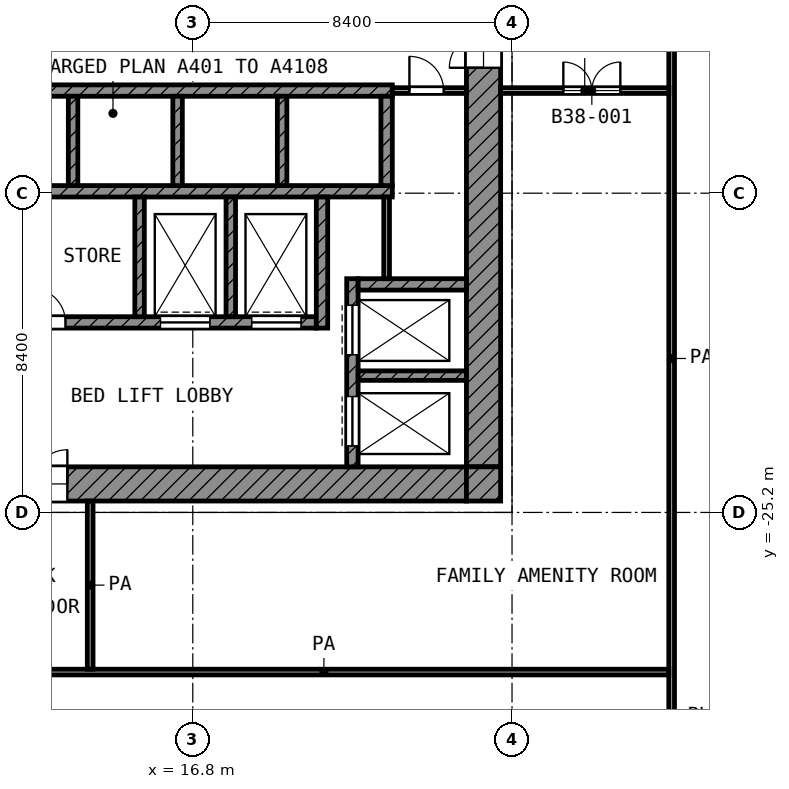
"""IFC4 building model, lengths in metres.
Left out: names, types, materials, properties, quantities, classifications, styles, units other than length and angle.
Written with IfcOpenShell. Run it as: python <this file> out.ifc"""

import sys

from ifc_helpers import new_model, si_unit, direction, frame, frame_2d, origin, place, context, subcontext, project, spatial, rectangle, extrude, element, fill, save


model = new_model("IFC4")
c1 = context("Model", 3, precision=1e-05, world=origin(), true_north=direction((0.0, 1.0)))
c2 = subcontext(c1, "Body", "Model", "MODEL_VIEW")
j1 = project(units=[si_unit("LENGTHUNIT", "METRE"), si_unit("PLANEANGLEUNIT", "RADIAN")], contexts=[c1])
p1 = place(None, origin())
s1 = spatial("IfcSite", under=j1, at=p1, CompositionType="ELEMENT")
p2 = place(p1, origin())
s2 = spatial("IfcBuilding", under=s1, at=p2, CompositionType="ELEMENT")
p3 = place(p2, frame((0.0, 0.0, 166.8)))
s3 = spatial("IfcBuildingStorey", under=s2, at=p3, CompositionType="ELEMENT", Elevation=166.8)
p4 = place(p3, frame((24.45, -24.0, 0.0), z_axis=(0.0, 0.0, 1.0), x_axis=(0.0, 1.0, 0.0)))
e1 = element("IfcWall", 1, at=p4, inside=s3, PredefinedType="SHEAR", context=c2, shape_type="SweptSolid", body=[
    extrude(rectangle(XDim=18.6, YDim=0.9, at=frame_2d((9.3, 0.0))), origin(), (0.0, 0.0, 1.0), 3.6),
])
p5 = place(p4, frame((10.5, 0.0, 0.0)))
e2 = element("IfcOpeningElement", 2, at=p5, cuts=e1, PredefinedType="OPENING", context=c2, shape_type="SweptSolid", body=[
    extrude(rectangle(XDim=1.8, YDim=2.1, at=frame_2d((0.9, 1.05))), frame((0.0, 0.46, 0.0), z_axis=(0.0, -1.0, 0.0), x_axis=(1.0, 0.0, 0.0)), (0.0, 0.0, 1.0), 0.92),
])
p6 = place(p3, frame((5.4, -24.45, 0.0), z_axis=(0.0, 0.0, 1.0), x_axis=(1.0, 0.0, 0.0)))
e3 = element("IfcWall", 3, at=p6, inside=s3, PredefinedType="SHEAR", context=c2, shape_type="SweptSolid", body=[
    extrude(rectangle(XDim=18.6, YDim=0.9, at=frame_2d((9.3, 0.0))), origin(), (0.0, 0.0, 1.0), 3.6),
])
p7 = place(p6, frame((6.3, 0.0, 0.0)))
e4 = element("IfcOpeningElement", 4, at=p7, cuts=e3, PredefinedType="OPENING", context=c2, shape_type="SweptSolid", body=[
    extrude(rectangle(XDim=1.8, YDim=2.1, at=frame_2d((0.9, 1.05))), frame((0.0, 0.46, 0.0), z_axis=(0.0, -1.0, 0.0), x_axis=(1.0, 0.0, 0.0)), (0.0, 0.0, 1.0), 0.92),
])
p8 = place(p3, frame((24.45, -24.9, 0.0), z_axis=(0.0, 0.0, 1.0), x_axis=(0.0, 1.0, 0.0)))
e5 = element("IfcWall", 5, at=p8, inside=s3, PredefinedType="SHEAR", context=c2, shape_type="SweptSolid", body=[
    extrude(rectangle(XDim=0.9, YDim=0.9, at=frame_2d((0.45, 0.0))), origin(), (0.0, 0.0, 1.0), 3.6),
])
p9 = place(p3, frame((5.4, -14.1, 0.0), z_axis=(0.0, 0.0, 1.0), x_axis=(1.0, 0.0, 0.0)))
e6 = element("IfcWall", 6, at=p9, inside=s3, PredefinedType="SHEAR", context=c2, shape_type="SweptSolid", body=[
    extrude(rectangle(XDim=16.65, YDim=0.3, at=frame_2d((8.325, 0.0))), origin(), (0.0, 0.0, 1.0), 3.6),
])
p10 = place(p9, frame((0.825, 0.0, 0.0)))
e7 = element("IfcOpeningElement", 7, at=p10, cuts=e6, PredefinedType="OPENING", context=c2, shape_type="SweptSolid", body=[
    extrude(rectangle(XDim=1.1, YDim=2.1, at=frame_2d((0.55, 1.05))), frame((0.0, 0.16, 0.0), z_axis=(0.0, -1.0, 0.0), x_axis=(1.0, 0.0, 0.0)), (0.0, 0.0, 1.0), 0.32),
])
p11 = place(p9, frame((3.575, 0.0, 0.0)))
e8 = element("IfcOpeningElement", 8, at=p11, cuts=e6, PredefinedType="OPENING", context=c2, shape_type="SweptSolid", body=[
    extrude(rectangle(XDim=1.1, YDim=2.1, at=frame_2d((0.55, 1.05))), frame((0.0, 0.16, 0.0), z_axis=(0.0, -1.0, 0.0), x_axis=(1.0, 0.0, 0.0)), (0.0, 0.0, 1.0), 0.32),
])
p12 = place(p3, frame((5.4, -16.75, 0.0), z_axis=(0.0, 0.0, 1.0), x_axis=(1.0, 0.0, 0.0)))
e9 = element("IfcWall", 9, at=p12, inside=s3, PredefinedType="SHEAR", context=c2, shape_type="SweptSolid", body=[
    extrude(rectangle(XDim=16.65, YDim=0.3, at=frame_2d((8.325, 0.0))), origin(), (0.0, 0.0, 1.0), 3.6),
])
p13 = place(p3, frame((5.4, -20.2, 0.0), z_axis=(0.0, 0.0, 1.0), x_axis=(1.0, 0.0, 0.0)))
e10 = element("IfcWall", 10, at=p13, inside=s3, PredefinedType="SHEAR", context=c2, shape_type="SweptSolid", body=[
    extrude(rectangle(XDim=14.65, YDim=0.3, at=frame_2d((7.325, 0.0))), origin(), (0.0, 0.0, 1.0), 3.6),
])
p14 = place(p13, frame((10.55, 0.0, 0.0)))
e11 = element("IfcOpeningElement", 11, at=p14, cuts=e10, PredefinedType="OPENING", context=c2, shape_type="SweptSolid", body=[
    extrude(rectangle(XDim=1.3, YDim=2.1, at=frame_2d((0.65, 1.05))), frame((0.0, 0.16, 0.0), z_axis=(0.0, -1.0, 0.0), x_axis=(1.0, 0.0, 0.0)), (0.0, 0.0, 1.0), 0.32),
])
p15 = place(p13, frame((12.95, 0.0, 0.0)))
e12 = element("IfcOpeningElement", 12, at=p15, cuts=e10, PredefinedType="OPENING", context=c2, shape_type="SweptSolid", body=[
    extrude(rectangle(XDim=1.3, YDim=2.1, at=frame_2d((0.65, 1.05))), frame((0.0, 0.16, 0.0), z_axis=(0.0, -1.0, 0.0), x_axis=(1.0, 0.0, 0.0)), (0.0, 0.0, 1.0), 0.32),
])
p16 = place(p13, frame((0.55, 0.0, 0.0)))
e13 = element("IfcOpeningElement", 13, at=p16, cuts=e10, PredefinedType="OPENING", context=c2, shape_type="SweptSolid", body=[
    extrude(rectangle(XDim=1.3, YDim=2.1, at=frame_2d((0.65, 1.05))), frame((0.0, 0.16, 0.0), z_axis=(0.0, -1.0, 0.0), x_axis=(1.0, 0.0, 0.0)), (0.0, 0.0, 1.0), 0.32),
])
p17 = place(p13, frame((2.95, 0.0, 0.0)))
e14 = element("IfcOpeningElement", 14, at=p17, cuts=e10, PredefinedType="OPENING", context=c2, shape_type="SweptSolid", body=[
    extrude(rectangle(XDim=1.3, YDim=2.1, at=frame_2d((0.65, 1.05))), frame((0.0, 0.16, 0.0), z_axis=(0.0, -1.0, 0.0), x_axis=(1.0, 0.0, 0.0)), (0.0, 0.0, 1.0), 0.32),
])
p18 = place(p13, frame((7.15, 0.0, 0.0)))
e15 = element("IfcOpeningElement", 15, at=p18, cuts=e10, PredefinedType="OPENING", context=c2, shape_type="SweptSolid", body=[
    extrude(rectangle(XDim=0.9, YDim=2.1, at=frame_2d((0.45, 1.05))), frame((0.0, 0.16, 0.0), z_axis=(0.0, -1.0, 0.0), x_axis=(1.0, 0.0, 0.0)), (0.0, 0.0, 1.0), 0.32),
])
p19 = place(p3, frame((20.2, -20.35, 0.0), z_axis=(0.0, 0.0, 1.0), x_axis=(0.0, 1.0, 0.0)))
e16 = element("IfcWall", 16, at=p19, inside=s3, PredefinedType="SHEAR", context=c2, shape_type="SweptSolid", body=[
    extrude(rectangle(XDim=3.45, YDim=0.3, at=frame_2d((1.725, 0.0))), origin(), (0.0, 0.0, 1.0), 3.6),
])
p20 = place(p3, frame((21.9, -16.6, 0.0), z_axis=(0.0, 0.0, 1.0), x_axis=(0.0, 1.0, 0.0)))
e17 = element("IfcWall", 17, at=p20, inside=s3, PredefinedType="SHEAR", context=c2, shape_type="SweptSolid", body=[
    extrude(rectangle(XDim=2.35, YDim=0.3, at=frame_2d((1.175, 0.0))), origin(), (0.0, 0.0, 1.0), 3.6),
])
p21 = place(p3, frame((21.15, -19.2, 0.0), z_axis=(0.0, 0.0, 1.0), x_axis=(1.0, 0.0, 0.0)))
e18 = element("IfcWall", 18, at=p21, inside=s3, PredefinedType="SHEAR", context=c2, shape_type="SweptSolid", body=[
    extrude(rectangle(XDim=2.85, YDim=0.3, at=frame_2d((1.425, 0.0))), origin(), (0.0, 0.0, 1.0), 3.6),
])
p22 = place(p3, frame((21.0, -24.0, 0.0), z_axis=(0.0, 0.0, 1.0), x_axis=(0.0, 1.0, 0.0)))
e19 = element("IfcWall", 19, at=p22, inside=s3, PredefinedType="SHEAR", context=c2, shape_type="SweptSolid", body=[
    extrude(rectangle(XDim=4.95, YDim=0.3, at=frame_2d((2.475, 0.0))), origin(), (0.0, 0.0, 1.0), 3.6),
])
p23 = place(p22, frame((2.95, 0.0, 0.0)))
e20 = element("IfcOpeningElement", 20, at=p23, cuts=e19, PredefinedType="OPENING", context=c2, shape_type="SweptSolid", body=[
    extrude(rectangle(XDim=1.3, YDim=2.1, at=frame_2d((0.65, 1.05))), frame((0.0, 0.16, 0.0), z_axis=(0.0, -1.0, 0.0), x_axis=(1.0, 0.0, 0.0)), (0.0, 0.0, 1.0), 0.32),
])
p24 = place(p22, frame((0.55, 0.0, 0.0)))
e21 = element("IfcOpeningElement", 21, at=p24, cuts=e19, PredefinedType="OPENING", context=c2, shape_type="SweptSolid", body=[
    extrude(rectangle(XDim=1.3, YDim=2.1, at=frame_2d((0.65, 1.05))), frame((0.0, 0.16, 0.0), z_axis=(0.0, -1.0, 0.0), x_axis=(1.0, 0.0, 0.0)), (0.0, 0.0, 1.0), 0.32),
])
p25 = place(p3, frame((21.15, -21.6, 0.0), z_axis=(0.0, 0.0, 1.0), x_axis=(1.0, 0.0, 0.0)))
e22 = element("IfcWall", 22, at=p25, inside=s3, PredefinedType="SHEAR", context=c2, shape_type="SweptSolid", body=[
    extrude(rectangle(XDim=2.85, YDim=0.25, at=frame_2d((1.425, 0.0))), origin(), (0.0, 0.0, 1.0), 3.6),
])
for number, where, z_axis, x_axis in (
    (23, (15.4, -20.05, 0.0), (0.0, 0.0, 1.0), (0.0, 1.0, 0.0)),
    (24, (17.8, -20.05, 0.0), (0.0, 0.0, 1.0), (0.0, 1.0, 0.0)),
):
    element("IfcWall", number, at=place(p3, frame(where, z_axis=z_axis, x_axis=x_axis)), inside=s3, PredefinedType="SHEAR", context=c2, shape_type="SweptSolid", body=[
        extrude(rectangle(XDim=3.15, YDim=0.25, at=frame_2d((1.575, 0.0))), origin(), (0.0, 0.0, 1.0), 3.6),
    ])
for number, where, z_axis, x_axis in (
    (25, (13.65, -16.6, 0.0), (0.0, 0.0, 1.0), (0.0, 1.0, 0.0)),
    (26, (16.4, -16.6, 0.0), (0.0, 0.0, 1.0), (0.0, 1.0, 0.0)),
    (27, (19.15, -16.6, 0.0), (0.0, 0.0, 1.0), (0.0, 1.0, 0.0)),
):
    element("IfcWall", number, at=place(p3, frame(where, z_axis=z_axis, x_axis=x_axis)), inside=s3, PredefinedType="SHEAR", context=c2, shape_type="SweptSolid", body=[
        extrude(rectangle(XDim=2.35, YDim=0.25, at=frame_2d((1.175, 0.0))), origin(), (0.0, 0.0, 1.0), 3.6),
    ])
p26 = place(p3, frame((21.9, -19.05, 0.0), z_axis=(0.0, 0.0, 1.0), x_axis=(0.0, 1.0, 0.0)))
e28 = element("IfcWall", 28, at=p26, inside=s3, PredefinedType="PARTITIONING", context=c2, shape_type="SweptSolid", body=[
    extrude(rectangle(XDim=2.15, YDim=0.15, at=frame_2d((1.075, 0.0))), origin(), (0.0, 0.0, 1.0), 3.6),
])
p27 = place(p3, frame((22.05, -14.1, 0.0), z_axis=(0.0, 0.0, 1.0), x_axis=(1.0, 0.0, 0.0)))
e29 = element("IfcWall", 29, at=p27, inside=s3, PredefinedType="PARTITIONING", context=c2, shape_type="SweptSolid", body=[
    extrude(rectangle(XDim=1.95, YDim=0.15, at=frame_2d((0.975, 0.0))), origin(), (0.0, 0.0, 1.0), 3.6),
])
p28 = place(p27, frame((0.45, 0.0, 0.0)))
e30 = element("IfcOpeningElement", 30, at=p28, cuts=e29, PredefinedType="OPENING", context=c2, shape_type="SweptSolid", body=[
    extrude(rectangle(XDim=0.9, YDim=2.1, at=frame_2d((0.45, 1.05))), frame((0.0, 0.085, 0.0), z_axis=(0.0, -1.0, 0.0), x_axis=(1.0, 0.0, 0.0)), (0.0, 0.0, 1.0), 0.17),
])
p29 = place(p3, frame((11.175, -29.4, 0.0), z_axis=(0.0, 0.0, 1.0), x_axis=(1.0, 0.0, 0.0)))
e31 = element("IfcWall", 31, at=p29, inside=s3, PredefinedType="PARTITIONING", context=c2, shape_type="SweptSolid", body=[
    extrude(rectangle(XDim=18.15, YDim=0.15, at=frame_2d((9.075, 0.0))), origin(), (0.0, 0.0, 1.0), 3.6),
])
p30 = place(p3, frame((24.9, -14.1, 0.0), z_axis=(0.0, 0.0, 1.0), x_axis=(1.0, 0.0, 0.0)))
e32 = element("IfcWall", 32, at=p30, inside=s3, PredefinedType="PARTITIONING", context=c2, shape_type="SweptSolid", body=[
    extrude(rectangle(XDim=4.425, YDim=0.15, at=frame_2d((2.212, 0.0))), origin(), (0.0, 0.0, 1.0), 3.6),
])
p31 = place(p30, frame((1.65, 0.0, 0.0)))
e33 = element("IfcOpeningElement", 33, at=p31, cuts=e32, PredefinedType="OPENING", context=c2, shape_type="SweptSolid", body=[
    extrude(rectangle(XDim=1.5, YDim=2.1, at=frame_2d((0.75, 1.05))), frame((0.0, 0.085, 0.0), z_axis=(0.0, -1.0, 0.0), x_axis=(1.0, 0.0, 0.0)), (0.0, 0.0, 1.0), 0.17),
])
p32 = place(p3, frame((14.1, -29.325, 0.0), z_axis=(0.0, 0.0, 1.0), x_axis=(0.0, 1.0, 0.0)))
e34 = element("IfcWall", 34, at=p32, inside=s3, PredefinedType="PARTITIONING", context=c2, shape_type="SweptSolid", body=[
    extrude(rectangle(XDim=4.425, YDim=0.15, at=frame_2d((2.212, 0.0))), origin(), (0.0, 0.0, 1.0), 3.6),
])
p33 = place(p3, frame((29.4, -31.198, 0.0), z_axis=(0.0, 0.0, 1.0), x_axis=(0.0, 1.0, 0.0)))
e35 = element("IfcWall", 35, at=p33, inside=s3, PredefinedType="PARTITIONING", context=c2, shape_type="SweptSolid", body=[
    extrude(rectangle(XDim=20.098, YDim=0.15, at=frame_2d((10.049, 0.0))), origin(), (0.0, 0.0, 1.0), 3.6),
])
p34 = place(p23, origin())
e36 = element("IfcDoor", 36, at=p34, inside=s3, OperationType="DOUBLE_DOOR_SLIDING", PredefinedType="DOOR", context=c2, shape_type="SweptSolid", body=[
    extrude(rectangle(XDim=1.3, YDim=2.1, at=frame_2d((0.65, 1.05))), frame((0.0, 0.025, 0.0), z_axis=(0.0, -1.0, 0.0), x_axis=(1.0, 0.0, 0.0)), (0.0, 0.0, 1.0), 0.05),
])
fill(e20, e36)
p35 = place(p24, origin())
e37 = element("IfcDoor", 37, at=p35, inside=s3, OperationType="DOUBLE_DOOR_SLIDING", PredefinedType="DOOR", context=c2, shape_type="SweptSolid", body=[
    extrude(rectangle(XDim=1.3, YDim=2.1, at=frame_2d((0.65, 1.05))), frame((0.0, 0.025, 0.0), z_axis=(0.0, -1.0, 0.0), x_axis=(1.0, 0.0, 0.0)), (0.0, 0.0, 1.0), 0.05),
])
fill(e21, e37)
p36 = place(p14, origin())
e38 = element("IfcDoor", 38, at=p36, inside=s3, OperationType="DOUBLE_DOOR_SLIDING", PredefinedType="DOOR", context=c2, shape_type="SweptSolid", body=[
    extrude(rectangle(XDim=1.3, YDim=2.1, at=frame_2d((0.65, 1.05))), frame((0.0, 0.025, 0.0), z_axis=(0.0, -1.0, 0.0), x_axis=(1.0, 0.0, 0.0)), (0.0, 0.0, 1.0), 0.05),
])
fill(e11, e38)
p37 = place(p15, origin())
e39 = element("IfcDoor", 39, at=p37, inside=s3, OperationType="DOUBLE_DOOR_SLIDING", PredefinedType="DOOR", context=c2, shape_type="SweptSolid", body=[
    extrude(rectangle(XDim=1.3, YDim=2.1, at=frame_2d((0.65, 1.05))), frame((0.0, 0.025, 0.0), z_axis=(0.0, -1.0, 0.0), x_axis=(1.0, 0.0, 0.0)), (0.0, 0.0, 1.0), 0.05),
])
fill(e12, e39)
p38 = place(p5, origin())
e40 = element("IfcDoor", 40, at=p38, inside=s3, OperationType="DOUBLE_DOOR_SINGLE_SWING", PredefinedType="DOOR", context=c2, shape_type="SweptSolid", body=[
    extrude(rectangle(XDim=1.8, YDim=2.1, at=frame_2d((0.9, 1.05))), frame((0.0, 0.025, 0.0), z_axis=(0.0, -1.0, 0.0), x_axis=(1.0, 0.0, 0.0)), (0.0, 0.0, 1.0), 0.05),
])
fill(e2, e40)
p39 = place(p7, origin())
e41 = element("IfcDoor", 41, at=p39, inside=s3, OperationType="DOUBLE_DOOR_SINGLE_SWING", PredefinedType="DOOR", context=c2, shape_type="SweptSolid", body=[
    extrude(rectangle(XDim=1.8, YDim=2.1, at=frame_2d((0.9, 1.05))), frame((0.0, 0.025, 0.0), z_axis=(0.0, -1.0, 0.0), x_axis=(1.0, 0.0, 0.0)), (0.0, 0.0, 1.0), 0.05),
])
fill(e4, e41)
p40 = place(p28, origin())
e42 = element("IfcDoor", 42, at=p40, inside=s3, OperationType="SINGLE_SWING_LEFT", PredefinedType="DOOR", context=c2, shape_type="SweptSolid", body=[
    extrude(rectangle(XDim=0.9, YDim=2.1, at=frame_2d((0.45, 1.05))), frame((0.0, 0.025, 0.0), z_axis=(0.0, -1.0, 0.0), x_axis=(1.0, 0.0, 0.0)), (0.0, 0.0, 1.0), 0.05),
])
fill(e30, e42)
p41 = place(p18, origin())
e43 = element("IfcDoor", 43, at=p41, inside=s3, OperationType="SINGLE_SWING_LEFT", PredefinedType="DOOR", context=c2, shape_type="SweptSolid", body=[
    extrude(rectangle(XDim=0.9, YDim=2.1, at=frame_2d((0.45, 1.05))), frame((0.0, 0.025, 0.0), z_axis=(0.0, -1.0, 0.0), x_axis=(1.0, 0.0, 0.0)), (0.0, 0.0, 1.0), 0.05),
])
fill(e15, e43)
p42 = place(p31, origin())
e44 = element("IfcDoor", 44, at=p42, inside=s3, OperationType="DOUBLE_DOOR_SINGLE_SWING", PredefinedType="DOOR", context=c2, shape_type="SweptSolid", body=[
    extrude(rectangle(XDim=1.5, YDim=2.1, at=frame_2d((0.75, 1.05))), frame((0.0, 0.025, 0.0), z_axis=(0.0, -1.0, 0.0), x_axis=(1.0, 0.0, 0.0)), (0.0, 0.0, 1.0), 0.05),
])
fill(e33, e44)
save(model, sys.argv[1])
